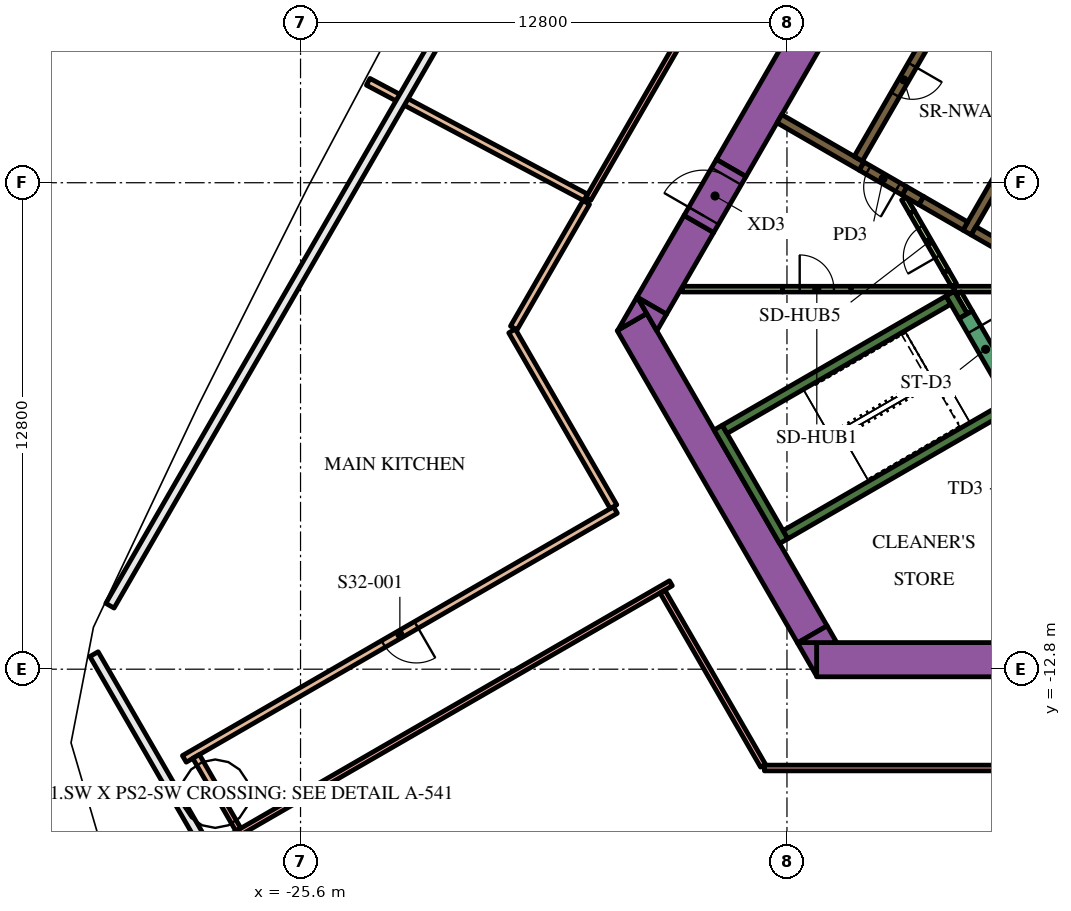
"""IFC4 building model, lengths in metres.
Left out: names, types, materials, properties, quantities, classifications, styles, units other than length and angle.
Written with IfcOpenShell. Run it as: python <this file> out.ifc"""

import sys

from ifc_helpers import new_model, si_unit, direction, frame, frame_2d, origin, place, context, subcontext, project, spatial, polyline, rectangle, outline, extrude, element, fill, save


model = new_model("IFC4")
c1 = context("Model", 3, precision=1e-05, world=origin(), true_north=direction((0.0, 1.0)))
c2 = subcontext(c1, "Body", "Model", "MODEL_VIEW")
j1 = project(units=[si_unit("LENGTHUNIT", "METRE"), si_unit("PLANEANGLEUNIT", "RADIAN")], contexts=[c1])
p1 = place(None, origin())
s1 = spatial("IfcSite", under=j1, at=p1, CompositionType="ELEMENT")
p2 = place(p1, origin())
s2 = spatial("IfcBuilding", under=s1, at=p2, CompositionType="ELEMENT")
p3 = place(p2, frame((0.0, 0.0, 134.4)))
s3 = spatial("IfcBuildingStorey", under=s2, at=p3, CompositionType="ELEMENT", Elevation=134.4)
p4 = place(p3, frame((-14.268, 0.387, 0.0), z_axis=(0.0, 0.0, 1.0), x_axis=(0.499994617707, 0.866028511231, 0.0)))
e1 = element("IfcWall", 1, at=p4, inside=s3, PredefinedType="SOLIDWALL", context=c2, shape_type="SweptSolid", body=[
    extrude(rectangle(XDim=18.817, YDim=0.9, at=frame_2d((9.409, 0.0))), origin(), (0.0, 0.0, 1.0), 7.2),
])
p5 = place(p3, frame((-12.019, -12.55, 0.0), z_axis=(0.0, 0.0, 1.0), x_axis=(1.0, 0.0, 0.0)))
e2 = element("IfcWall", 2, at=p5, inside=s3, PredefinedType="SOLIDWALL", context=c2, shape_type="SweptSolid", body=[
    extrude(rectangle(XDim=21.63, YDim=0.9, at=frame_2d((10.815, 0.0))), origin(), (0.0, 0.0, 1.0), 7.2),
])
p6 = place(p3, origin())
e3 = element("IfcWall", 3, at=p6, inside=s3, PredefinedType="SOLIDWALL", context=c2, shape_type="SweptSolid", body=[
    extrude(outline(polyline([(-12.529, -12.1), (-12.021, -12.1), (-12.021, -12.98), (-12.529, -12.1)])), origin(), (0.0, 0.0, 1.0), 7.2),
])
p7 = place(p3, frame((-12.134, -11.883, 0.0), z_axis=(0.0, 0.0, 1.0), x_axis=(-0.500005339912, 0.866022320763, 0.0)))
e4 = element("IfcWall", 4, at=p7, inside=s3, PredefinedType="SOLIDWALL", context=c2, shape_type="SweptSolid", body=[
    extrude(rectangle(XDim=9.488, YDim=0.9, at=frame_2d((4.744, 0.0))), origin(), (0.0, 0.0, 1.0), 7.2),
])
e5 = element("IfcWall", 5, at=p6, inside=s3, PredefinedType="SOLIDWALL", context=c2, shape_type="SweptSolid", body=[
    extrude(outline(polyline([(-16.489, -3.44), (-17.251, -3.88), (-16.743, -3.0), (-16.489, -3.44)])), origin(), (0.0, 0.0, 1.0), 7.2),
])
e6 = element("IfcWall", 6, at=p6, inside=s3, PredefinedType="SOLIDWALL", context=c2, shape_type="SweptSolid", body=[
    extrude(outline(polyline([(-11.489, -12.1), (-12.505, -12.1), (-11.743, -11.66), (-11.489, -12.1)])), origin(), (0.0, 0.0, 1.0), 7.2),
])
p8 = place(p3, frame((-15.118, -1.085, 0.0), z_axis=(0.0, 0.0, 1.0), x_axis=(-0.50006606081, -0.865987260198, 0.0)))
e7 = element("IfcWall", 7, at=p8, inside=s3, PredefinedType="SOLIDWALL", context=c2, shape_type="SweptSolid", body=[
    extrude(rectangle(XDim=2.481, YDim=0.9, at=frame_2d((1.24, 0.0))), origin(), (0.0, 0.0, 1.0), 7.2),
])
e8 = element("IfcWall", 8, at=p6, inside=s3, PredefinedType="SOLIDWALL", context=c2, shape_type="SweptSolid", body=[
    extrude(outline(polyline([(-16.223, -3.9), (-16.732, -3.02), (-15.969, -3.46), (-16.223, -3.9)])), origin(), (0.0, 0.0, 1.0), 7.2),
])
p9 = place(p3, frame((-12.885, -9.431, 0.0), z_axis=(0.0, 0.0, 1.0), x_axis=(-0.500020560727, 0.866013532718, 0.0)))
e9 = element("IfcWall", 9, at=p9, inside=s3, PredefinedType="SOLIDWALL", context=c2, shape_type="SweptSolid", body=[
    extrude(rectangle(XDim=3.45, YDim=0.25, at=frame_2d((1.725, 0.0))), origin(), (0.0, 0.0, 1.0), 7.2),
])
p10 = place(p3, frame((-14.44, -6.49, 0.0), z_axis=(0.0, 0.0, 1.0), x_axis=(0.866022966069, 0.500004222222, 0.0)))
e10 = element("IfcWall", 10, at=p10, inside=s3, PredefinedType="SOLIDWALL", context=c2, shape_type="SweptSolid", body=[
    extrude(rectangle(XDim=6.8, YDim=0.25, at=frame_2d((3.4, 0.0))), origin(), (0.0, 0.0, 1.0), 7.2),
])
p11 = place(p3, frame((-8.163, -3.511, 0.0), z_axis=(0.0, 0.0, 1.0), x_axis=(-0.500206266495, 0.865906283012, 0.0)))
e11 = element("IfcWall", 11, at=p11, inside=s3, PredefinedType="SOLIDWALL", context=c2, shape_type="SweptSolid", body=[
    extrude(rectangle(XDim=0.684, YDim=0.25, at=frame_2d((0.342, 0.0))), origin(), (0.0, 0.0, 1.0), 7.2),
])
p12 = place(p3, frame((-12.84, -9.261, 0.0), z_axis=(0.0, 0.0, 1.0), x_axis=(0.866016039709, 0.500016218704, 0.0)))
e12 = element("IfcWall", 12, at=p12, inside=s3, PredefinedType="SOLIDWALL", context=c2, shape_type="SweptSolid", body=[
    extrude(rectangle(XDim=7.05, YDim=0.25, at=frame_2d((3.525, 0.0))), origin(), (0.0, 0.0, 1.0), 7.2),
])
p13 = place(p3, frame((-8.06, -1.311, 0.0), z_axis=(0.0, 0.0, 1.0), x_axis=(0.50000273126, 0.866023826885, 0.0)))
e13 = element("IfcWall", 13, at=p13, inside=s3, PredefinedType="SOLIDWALL", context=c2, shape_type="SweptSolid", body=[
    extrude(rectangle(XDim=10.33, YDim=0.25, at=frame_2d((5.165, 0.0))), origin(), (0.0, 0.0, 1.0), 7.2),
])
e14 = element("IfcWall", 14, at=p6, inside=s3, PredefinedType="SOLIDWALL", context=c2, shape_type="SweptSolid", body=[
    extrude(outline(polyline([(-5.922, -2.257), (-5.922, -2.257), (-5.705, -2.382), (-5.83, -2.598), (-6.418, -2.258), (-6.433, -2.153), (-6.433, -2.153), (-6.433, -2.153), (-6.508, -2.163), (-6.508, -2.163), (-6.508, -2.163), (-6.501, -2.21), (-7.952, -1.373), (-7.827, -1.156), (-5.922, -2.257)])), origin(), (0.0, 0.0, 1.0), 7.2),
])
p14 = place(p3, frame((-9.708, -0.215, 0.0), z_axis=(0.0, 0.0, 1.0), x_axis=(0.866113839764, -0.499846793097, 0.0)))
e15 = element("IfcWall", 15, at=p14, inside=s3, PredefinedType="SOLIDWALL", context=c2, shape_type="SweptSolid", body=[
    extrude(rectangle(XDim=0.51, YDim=0.25, at=frame_2d((0.255, 0.0))), origin(), (0.0, 0.0, 1.0), 7.2),
])
p15 = place(p3, frame((-12.999, 1.685, 0.0), z_axis=(0.0, 0.0, 1.0), x_axis=(0.865996765544, -0.500049599607, 0.0)))
e16 = element("IfcWall", 16, at=p15, inside=s3, PredefinedType="SOLIDWALL", context=c2, shape_type="SweptSolid", body=[
    extrude(rectangle(XDim=2.498, YDim=0.25, at=frame_2d((1.249, 0.0))), origin(), (0.0, 0.0, 1.0), 7.2),
])
p16 = place(p3, frame((-9.265, -0.471, 0.0), z_axis=(0.0, 0.0, 1.0), x_axis=(0.865954634268, -0.500122556369, 0.0)))
e17 = element("IfcWall", 17, at=p16, inside=s3, PredefinedType="SOLIDWALL", context=c2, shape_type="SweptSolid", body=[
    extrude(rectangle(XDim=1.338, YDim=0.25, at=frame_2d((0.669, 0.0))), origin(), (0.0, 0.0, 1.0), 7.2),
])
p17 = place(p3, frame((-12.915, -2.8, 0.0), z_axis=(0.0, 0.0, 1.0), x_axis=(-1.0, 0.0, 0.0)))
e18 = element("IfcWall", 18, at=p17, inside=s3, PredefinedType="PARTITIONING", context=c2, shape_type="SweptSolid", body=[
    extrude(rectangle(XDim=2.637, YDim=0.15, at=frame_2d((1.318, 0.0))), origin(), (0.0, 0.0, 1.0), 6.15),
])
p18 = place(p3, frame((-8.395, -2.8, 0.0), z_axis=(0.0, 0.0, 1.0), x_axis=(1.0, 0.0, 0.0)))
e19 = element("IfcWall", 19, at=p18, inside=s3, PredefinedType="PARTITIONING", context=c2, shape_type="SweptSolid", body=[
    extrude(rectangle(XDim=1.828, YDim=0.15, at=frame_2d((0.914, 0.0))), origin(), (0.0, 0.0, 1.0), 6.15),
])
p19 = place(p3, frame((-11.115, -2.8, 0.0), z_axis=(0.0, 0.0, 1.0), x_axis=(1.0, 0.0, 0.0)))
e20 = element("IfcWall", 20, at=p19, inside=s3, PredefinedType="PARTITIONING", context=c2, shape_type="SweptSolid", body=[
    extrude(rectangle(XDim=2.708, YDim=0.15, at=frame_2d((1.354, 0.0))), origin(), (0.0, 0.0, 1.0), 6.15),
])
p20 = place(p3, frame((-7.99, -3.412, 0.0), z_axis=(0.0, 0.0, 1.0), x_axis=(-0.500193841991, 0.86591346013, 0.0)))
e21 = element("IfcWall", 21, at=p20, inside=s3, PredefinedType="PARTITIONING", context=c2, shape_type="SweptSolid", body=[
    extrude(rectangle(XDim=0.583, YDim=0.15, at=frame_2d((0.292, 0.0))), origin(), (0.0, 0.0, 1.0), 6.15),
])
p21 = place(p3, frame((-8.612, -2.333, 0.0), z_axis=(0.0, 0.0, 1.0), x_axis=(0.500248216681, -0.86588204838, 0.0)))
e22 = element("IfcWall", 22, at=p21, inside=s3, PredefinedType="PARTITIONING", context=c2, shape_type="SweptSolid", body=[
    extrude(rectangle(XDim=0.415, YDim=0.15, at=frame_2d((0.208, 0.0))), origin(), (0.0, 0.0, 1.0), 6.15),
])
p22 = place(p3, frame((-9.512, -0.775, 0.0), z_axis=(0.0, 0.0, 1.0), x_axis=(-0.500080620599, 0.865978852456, 0.0)))
e23 = element("IfcWall", 23, at=p22, inside=s3, PredefinedType="PARTITIONING", context=c2, shape_type="SweptSolid", body=[
    extrude(rectangle(XDim=0.413, YDim=0.15, at=frame_2d((0.207, 0.0))), origin(), (0.0, 0.0, 1.0), 6.15),
])
p23 = place(p3, frame((-6.008, 9.144, 0.0), z_axis=(0.0, 0.0, 1.0), x_axis=(-0.500006956611, -0.866021387346, 0.0)))
e24 = element("IfcWall", 24, at=p23, inside=s3, PredefinedType="SOLIDWALL", context=c2, shape_type="SweptSolid", body=[
    extrude(rectangle(XDim=9.83, YDim=0.25, at=frame_2d((4.915, 0.0))), origin(), (0.0, 0.0, 1.0), 7.2),
])
p24 = place(p23, frame((0.585, 0.0, 0.0)))
e25 = element("IfcOpeningElement", 25, at=p24, cuts=e24, PredefinedType="OPENING", context=c2, shape_type="SweptSolid", body=[
    extrude(rectangle(XDim=1.1, YDim=2.1, at=frame_2d((0.55, 1.05))), frame((0.0, 0.135, 0.0), z_axis=(0.0, -1.0, 0.0), x_axis=(1.0, 0.0, 0.0)), (0.0, 0.0, 1.0), 0.27),
])
p25 = place(p23, frame((3.105, 0.0, 0.0)))
e26 = element("IfcOpeningElement", 26, at=p25, cuts=e24, PredefinedType="OPENING", context=c2, shape_type="SweptSolid", body=[
    extrude(rectangle(XDim=1.1, YDim=2.1, at=frame_2d((0.55, 1.05))), frame((0.0, 0.135, 0.0), z_axis=(0.0, -1.0, 0.0), x_axis=(1.0, 0.0, 0.0)), (0.0, 0.0, 1.0), 0.27),
])
p26 = place(p23, frame((6.985, 0.0, 0.0)))
e27 = element("IfcOpeningElement", 27, at=p26, cuts=e24, PredefinedType="OPENING", context=c2, shape_type="SweptSolid", body=[
    extrude(rectangle(XDim=0.9, YDim=2.1, at=frame_2d((0.45, 1.05))), frame((0.0, 0.135, 0.0), z_axis=(0.0, -1.0, 0.0), x_axis=(1.0, 0.0, 0.0)), (0.0, 0.0, 1.0), 0.27),
])
p27 = place(p3, frame((-8.098, -3.474, 0.0), z_axis=(0.0, 0.0, 1.0), x_axis=(0.49994051562, -0.866059744384, 0.0)))
e28 = element("IfcWall", 28, at=p27, inside=s3, PredefinedType="SOLIDWALL", context=c2, shape_type="SweptSolid", body=[
    extrude(rectangle(XDim=2.1, YDim=0.4, at=frame_2d((1.05, 0.0))), origin(), (0.0, 0.0, 1.0), 7.2),
])
p28 = place(p27, frame((0.45, 0.0, 0.0)))
e29 = element("IfcOpeningElement", 29, at=p28, cuts=e28, PredefinedType="OPENING", context=c2, shape_type="SweptSolid", body=[
    extrude(rectangle(XDim=1.2, YDim=2.1, at=frame_2d((0.6, 1.05))), frame((0.0, 0.21, 0.0), z_axis=(0.0, -1.0, 0.0), x_axis=(1.0, 0.0, 0.0)), (0.0, 0.0, 1.0), 0.42),
])
p29 = place(p3, frame((-9.708, -0.215, 0.0), z_axis=(0.0, 0.0, 1.0), x_axis=(-0.866004217611, 0.500036693733, 0.0)))
e30 = element("IfcWall", 30, at=p29, inside=s3, PredefinedType="SOLIDWALL", context=c2, shape_type="SweptSolid", body=[
    extrude(rectangle(XDim=1.3, YDim=0.25, at=frame_2d((0.65, 0.0))), origin(), (0.0, 0.0, 1.0), 7.2),
])
p30 = place(p29, frame((0.2, 0.0, 0.0)))
e31 = element("IfcOpeningElement", 31, at=p30, cuts=e30, PredefinedType="OPENING", context=c2, shape_type="SweptSolid", body=[
    extrude(rectangle(XDim=0.9, YDim=2.1, at=frame_2d((0.45, 1.05))), frame((0.0, 0.135, 0.0), z_axis=(0.0, -1.0, 0.0), x_axis=(1.0, 0.0, 0.0)), (0.0, 0.0, 1.0), 0.27),
])
p31 = place(p3, frame((-15.118, -1.085, 0.0), z_axis=(0.0, 0.0, 1.0), x_axis=(0.500000056704, 0.866025371046, 0.0)))
e32 = element("IfcWall", 32, at=p31, inside=s3, PredefinedType="SOLIDWALL", context=c2, shape_type="SweptSolid", body=[
    extrude(rectangle(XDim=1.7, YDim=0.9, at=frame_2d((0.85, 0.0))), origin(), (0.0, 0.0, 1.0), 7.2),
])
p32 = place(p31, frame((0.25, 0.0, 0.0)))
e33 = element("IfcOpeningElement", 33, at=p32, cuts=e32, PredefinedType="OPENING", context=c2, shape_type="SweptSolid", body=[
    extrude(rectangle(XDim=1.2, YDim=2.1, at=frame_2d((0.6, 1.05))), frame((0.0, 0.46, 0.0), z_axis=(0.0, -1.0, 0.0), x_axis=(1.0, 0.0, 0.0)), (0.0, 0.0, 1.0), 0.92),
])
p33 = place(p3, frame((-12.915, -2.8, 0.0), z_axis=(0.0, 0.0, 1.0), x_axis=(1.0, 0.0, 0.0)))
e34 = element("IfcWall", 34, at=p33, inside=s3, PredefinedType="PARTITIONING", context=c2, shape_type="SweptSolid", body=[
    extrude(rectangle(XDim=1.8, YDim=0.15, at=frame_2d((0.9, 0.0))), origin(), (0.0, 0.0, 1.0), 6.15),
])
p34 = place(p33, frame((0.45, 0.0, 0.0)))
e35 = element("IfcOpeningElement", 35, at=p34, cuts=e34, PredefinedType="OPENING", context=c2, shape_type="SweptSolid", body=[
    extrude(rectangle(XDim=0.9, YDim=2.1, at=frame_2d((0.45, 1.05))), frame((0.0, 0.085, 0.0), z_axis=(0.0, -1.0, 0.0), x_axis=(1.0, 0.0, 0.0)), (0.0, 0.0, 1.0), 0.17),
])
p35 = place(p3, frame((-8.612, -2.333, 0.0), z_axis=(0.0, 0.0, 1.0), x_axis=(-0.499961193289, 0.866047807691, 0.0)))
e36 = element("IfcWall", 36, at=p35, inside=s3, PredefinedType="PARTITIONING", context=c2, shape_type="SweptSolid", body=[
    extrude(rectangle(XDim=1.8, YDim=0.15, at=frame_2d((0.9, 0.0))), origin(), (0.0, 0.0, 1.0), 6.15),
])
p36 = place(p35, frame((0.45, 0.0, 0.0)))
e37 = element("IfcOpeningElement", 37, at=p36, cuts=e36, PredefinedType="OPENING", context=c2, shape_type="SweptSolid", body=[
    extrude(rectangle(XDim=0.9, YDim=2.1, at=frame_2d((0.45, 1.05))), frame((0.0, 0.085, 0.0), z_axis=(0.0, -1.0, 0.0), x_axis=(1.0, 0.0, 0.0)), (0.0, 0.0, 1.0), 0.17),
])
p37 = place(p3, frame((-13.395, -15.4, 0.0), z_axis=(0.0, 0.0, 1.0), x_axis=(1.0, 0.0, 0.0)))
e38 = element("IfcWall", 38, at=p37, inside=s3, PredefinedType="PARTITIONING", context=c2, shape_type="SweptSolid", body=[
    extrude(rectangle(XDim=22.774, YDim=0.15, at=frame_2d((11.387, 0.0))), origin(), (0.0, 0.0, 1.0), 6.15),
])
p38 = place(p37, frame((10.487, 0.0, 0.0)))
e39 = element("IfcOpeningElement", 39, at=p38, cuts=e38, PredefinedType="OPENING", context=c2, shape_type="SweptSolid", body=[
    extrude(rectangle(XDim=1.8, YDim=2.1, at=frame_2d((0.9, 1.05))), frame((0.0, 0.085, 0.0), z_axis=(0.0, -1.0, 0.0), x_axis=(1.0, 0.0, 0.0)), (0.0, 0.0, 1.0), 0.17),
])
p39 = place(p37, frame((7.377, 0.0, 0.0)))
e40 = element("IfcOpeningElement", 40, at=p39, cuts=e38, PredefinedType="OPENING", context=c2, shape_type="SweptSolid", body=[
    extrude(rectangle(XDim=1.8, YDim=2.1, at=frame_2d((0.9, 1.05))), frame((0.0, 0.085, 0.0), z_axis=(0.0, -1.0, 0.0), x_axis=(1.0, 0.0, 0.0)), (0.0, 0.0, 1.0), 0.17),
])
p40 = place(p3, frame((-6.639, 19.3, 0.0), z_axis=(0.0, 0.0, 1.0), x_axis=(-0.500001456469, -0.86602456289, 0.0)))
e41 = element("IfcWall", 41, at=p40, inside=s3, PredefinedType="PARTITIONING", context=c2, shape_type="SweptSolid", body=[
    extrude(rectangle(XDim=22.774, YDim=0.15, at=frame_2d((11.387, 0.0))), origin(), (0.0, 0.0, 1.0), 6.15),
])
p41 = place(p40, frame((10.487, 0.0, 0.0)))
e42 = element("IfcOpeningElement", 42, at=p41, cuts=e41, PredefinedType="OPENING", context=c2, shape_type="SweptSolid", body=[
    extrude(rectangle(XDim=1.8, YDim=2.1, at=frame_2d((0.9, 1.05))), frame((0.0, 0.085, 0.0), z_axis=(0.0, -1.0, 0.0), x_axis=(1.0, 0.0, 0.0)), (0.0, 0.0, 1.0), 0.17),
])
p42 = place(p40, frame((7.377, 0.0, 0.0)))
e43 = element("IfcOpeningElement", 43, at=p42, cuts=e41, PredefinedType="OPENING", context=c2, shape_type="SweptSolid", body=[
    extrude(rectangle(XDim=1.8, YDim=2.1, at=frame_2d((0.9, 1.05))), frame((0.0, 0.085, 0.0), z_axis=(0.0, -1.0, 0.0), x_axis=(1.0, 0.0, 0.0)), (0.0, 0.0, 1.0), 0.17),
])
p43 = place(p3, frame((-17.314, -8.611, 0.0), z_axis=(0.0, 0.0, 1.0), x_axis=(-0.866025427251, -0.499999959354, 0.0)))
e44 = element("IfcWall", 44, at=p43, inside=s3, PredefinedType="PARTITIONING", context=c2, shape_type="SweptSolid", body=[
    extrude(rectangle(XDim=13.099, YDim=0.2, at=frame_2d((6.549, 0.0))), origin(), (0.0, 0.0, 1.0), 6.15),
])
p44 = place(p43, frame((6.049, 0.0, 0.0)))
e45 = element("IfcOpeningElement", 45, at=p44, cuts=e44, PredefinedType="OPENING", context=c2, shape_type="SweptSolid", body=[
    extrude(rectangle(XDim=1.0, YDim=2.1, at=frame_2d((0.5, 1.05))), frame((0.0, 0.11, 0.0), z_axis=(0.0, -1.0, 0.0), x_axis=(1.0, 0.0, 0.0)), (0.0, 0.0, 1.0), 0.22),
])
p45 = place(p3, frame((-15.854, -10.539, 0.0), z_axis=(0.0, 0.0, 1.0), x_axis=(-0.866027799164, -0.499995851058, 0.0)))
e46 = element("IfcWall", 46, at=p45, inside=s3, PredefinedType="PARTITIONING", context=c2, shape_type="SweptSolid", body=[
    extrude(rectangle(XDim=13.398, YDim=0.15, at=frame_2d((6.699, 0.0))), origin(), (0.0, 0.0, 1.0), 6.15),
])
p46 = place(p3, frame((-23.82, 2.656, 0.0), z_axis=(0.0, 0.0, 1.0), x_axis=(0.883021561778, -0.469332421035, 0.0)))
e47 = element("IfcWall", 47, at=p46, inside=s3, PredefinedType="PARTITIONING", context=c2, shape_type="SweptSolid", body=[
    extrude(rectangle(XDim=6.48, YDim=0.2, at=frame_2d((3.24, 0.0))), origin(), (0.0, 0.0, 1.0), 6.15),
])
p47 = place(p3, frame((-17.364, -8.524, 0.0), z_axis=(0.0, 0.0, 1.0), x_axis=(-0.500014009721, 0.866017315117, 0.0)))
e48 = element("IfcWall", 48, at=p47, inside=s3, PredefinedType="PARTITIONING", context=c2, shape_type="SweptSolid", body=[
    extrude(rectangle(XDim=5.34, YDim=0.2, at=frame_2d((2.67, 0.0))), origin(), (0.0, 0.0, 1.0), 6.15),
])
p48 = place(p3, frame((-13.429, -15.339, 0.0), z_axis=(0.0, 0.0, 1.0), x_axis=(-0.500006123685, 0.866021868245, 0.0)))
e49 = element("IfcWall", 49, at=p48, inside=s3, PredefinedType="PARTITIONING", context=c2, shape_type="SweptSolid", body=[
    extrude(rectangle(XDim=5.29, YDim=0.15, at=frame_2d((2.645, 0.0))), origin(), (0.0, 0.0, 1.0), 6.15),
])
p49 = place(p3, frame((-19.989, -3.822, 0.0), z_axis=(0.0, 0.0, 1.0), x_axis=(0.499986503906, 0.866033195618, 0.0)))
e50 = element("IfcWall", 50, at=p49, inside=s3, PredefinedType="PARTITIONING", context=c2, shape_type="SweptSolid", body=[
    extrude(rectangle(XDim=3.815, YDim=0.2, at=frame_2d((1.907, 0.0))), origin(), (0.0, 0.0, 1.0), 6.15),
])
p50 = place(p3, frame((-27.798, -16.05, 0.0), z_axis=(0.0, 0.0, 1.0), x_axis=(-0.499933745558, 0.866063652425, 0.0)))
e51 = element("IfcWall", 51, at=p50, inside=s3, PredefinedType="PARTITIONING", context=c2, shape_type="SweptSolid", body=[
    extrude(rectangle(XDim=1.1, YDim=0.2, at=frame_2d((0.55, 0.0))), origin(), (0.0, 0.0, 1.0), 6.15),
])
p51 = place(p3, frame((-27.238, -17.019, 0.0), z_axis=(0.0, 0.0, 1.0), x_axis=(-0.499995378973, 0.866028071719, 0.0)))
e52 = element("IfcWall", 52, at=p51, inside=s3, PredefinedType="PARTITIONING", context=c2, shape_type="SweptSolid", body=[
    extrude(rectangle(XDim=1.11, YDim=0.15, at=frame_2d((0.555, 0.0))), origin(), (0.0, 0.0, 1.0), 6.15),
])
p52 = place(p26, origin())
e53 = element("IfcDoor", 53, at=p52, inside=s3, OperationType="SINGLE_SWING_LEFT", PredefinedType="DOOR", context=c2, shape_type="SweptSolid", body=[
    extrude(rectangle(XDim=0.9, YDim=2.1, at=frame_2d((0.45, 1.05))), frame((0.0, 0.025, 0.0), z_axis=(0.0, -1.0, 0.0), x_axis=(1.0, 0.0, 0.0)), (0.0, 0.0, 1.0), 0.05),
])
fill(e27, e53)
p53 = place(p28, origin())
e54 = element("IfcDoor", 54, at=p53, inside=s3, OperationType="SINGLE_SWING_LEFT", PredefinedType="DOOR", context=c2, shape_type="SweptSolid", body=[
    extrude(rectangle(XDim=1.2, YDim=2.1, at=frame_2d((0.6, 1.05))), frame((0.0, 0.025, 0.0), z_axis=(0.0, -1.0, 0.0), x_axis=(1.0, 0.0, 0.0)), (0.0, 0.0, 1.0), 0.05),
])
fill(e29, e54)
p54 = place(p30, origin())
e55 = element("IfcDoor", 55, at=p54, inside=s3, OperationType="SINGLE_SWING_LEFT", PredefinedType="DOOR", context=c2, shape_type="SweptSolid", body=[
    extrude(rectangle(XDim=0.9, YDim=2.1, at=frame_2d((0.45, 1.05))), frame((0.0, 0.025, 0.0), z_axis=(0.0, -1.0, 0.0), x_axis=(1.0, 0.0, 0.0)), (0.0, 0.0, 1.0), 0.05),
])
fill(e31, e55)
p55 = place(p32, origin())
e56 = element("IfcDoor", 56, at=p55, inside=s3, OperationType="SINGLE_SWING_LEFT", PredefinedType="DOOR", context=c2, shape_type="SweptSolid", body=[
    extrude(rectangle(XDim=1.2, YDim=2.1, at=frame_2d((0.6, 1.05))), frame((0.0, 0.025, 0.0), z_axis=(0.0, -1.0, 0.0), x_axis=(1.0, 0.0, 0.0)), (0.0, 0.0, 1.0), 0.05),
])
fill(e33, e56)
p56 = place(p34, origin())
e57 = element("IfcDoor", 57, at=p56, inside=s3, OperationType="SINGLE_SWING_LEFT", PredefinedType="DOOR", context=c2, shape_type="SweptSolid", body=[
    extrude(rectangle(XDim=0.9, YDim=2.1, at=frame_2d((0.45, 1.05))), frame((0.0, 0.025, 0.0), z_axis=(0.0, -1.0, 0.0), x_axis=(1.0, 0.0, 0.0)), (0.0, 0.0, 1.0), 0.05),
])
fill(e35, e57)
p57 = place(p36, origin())
e58 = element("IfcDoor", 58, at=p57, inside=s3, OperationType="SINGLE_SWING_LEFT", PredefinedType="DOOR", context=c2, shape_type="SweptSolid", body=[
    extrude(rectangle(XDim=0.9, YDim=2.1, at=frame_2d((0.45, 1.05))), frame((0.0, 0.025, 0.0), z_axis=(0.0, -1.0, 0.0), x_axis=(1.0, 0.0, 0.0)), (0.0, 0.0, 1.0), 0.05),
])
fill(e37, e58)
p58 = place(p44, origin())
e59 = element("IfcDoor", 59, at=p58, inside=s3, OperationType="SINGLE_SWING_RIGHT", PredefinedType="DOOR", context=c2, shape_type="SweptSolid", body=[
    extrude(rectangle(XDim=1.0, YDim=2.1, at=frame_2d((0.5, 1.05))), frame((0.0, 0.025, 0.0), z_axis=(0.0, -1.0, 0.0), x_axis=(1.0, 0.0, 0.0)), (0.0, 0.0, 1.0), 0.05),
])
fill(e45, e59)
save(model, sys.argv[1])
